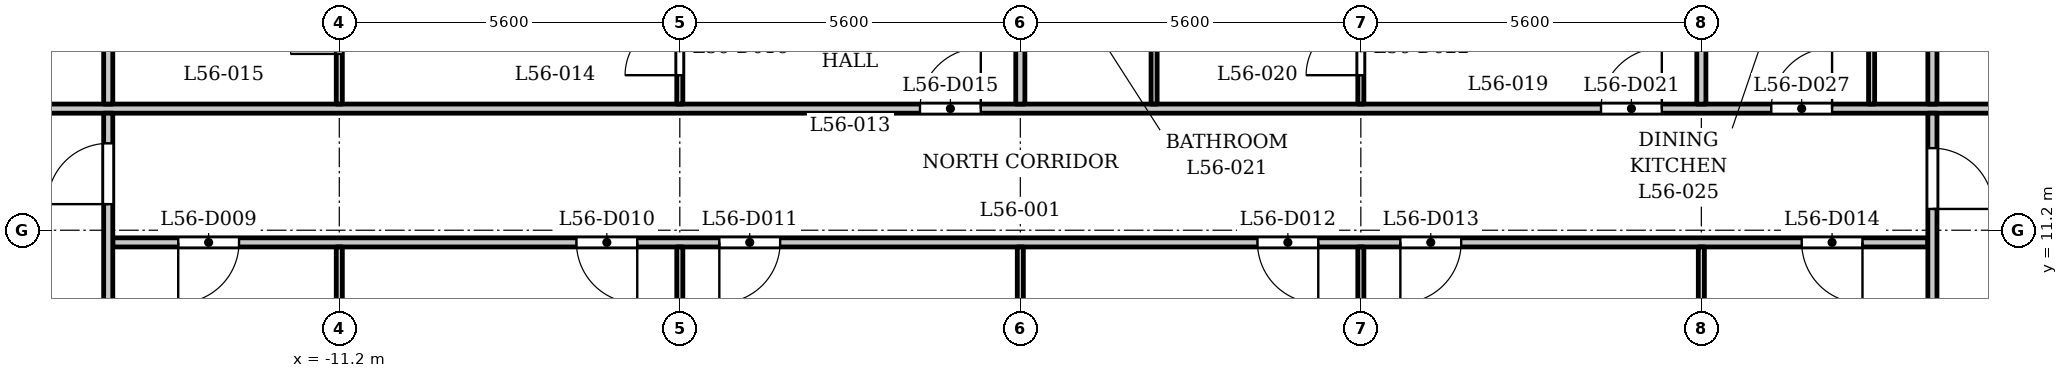
"""IFC4 building model, lengths in metres.
Left out: names, types, materials, properties, quantities, classifications, styles, units other than length and angle.
Written with IfcOpenShell. Run it as: python <this file> out.ifc"""

import sys

from ifc_helpers import new_model, si_unit, direction, frame, frame_2d, origin, place, context, subcontext, project, spatial, rectangle, extrude, element, fill, save


model = new_model("IFC4")
c1 = context("Model", 3, precision=1e-05, world=origin(), true_north=direction((0.0, 1.0)))
c2 = subcontext(c1, "Body", "Model", "MODEL_VIEW")
j1 = project(units=[si_unit("LENGTHUNIT", "METRE"), si_unit("PLANEANGLEUNIT", "RADIAN")], contexts=[c1])
p1 = place(None, origin())
s1 = spatial("IfcSite", under=j1, at=p1, CompositionType="ELEMENT")
p2 = place(p1, origin())
s2 = spatial("IfcBuilding", under=s1, at=p2, CompositionType="ELEMENT")
p3 = place(p2, frame((0.0, 0.0, 216.9)))
s3 = spatial("IfcBuildingStorey", under=s2, at=p3, CompositionType="ELEMENT", Elevation=216.9)
p4 = place(p3, frame((-14.925, 11.0, 0.0), z_axis=(0.0, 0.0, 1.0), x_axis=(1.0, 0.0, 0.0)))
e1 = element("IfcWall", 1, at=p4, inside=s3, PredefinedType="PARTITIONING", context=c2, shape_type="SweptSolid", body=[
    extrude(rectangle(XDim=29.85, YDim=0.15, at=frame_2d((14.925, 0.0))), origin(), (0.0, 0.0, 1.0), 3.2),
])
p5 = place(p4, frame((1.076, 0.0, 0.0)))
e2 = element("IfcOpeningElement", 2, at=p5, cuts=e1, PredefinedType="OPENING", context=c2, shape_type="SweptSolid", body=[
    extrude(rectangle(XDim=1.0, YDim=2.1, at=frame_2d((0.5, 1.05))), frame((0.0, 0.085, 0.0), z_axis=(0.0, -1.0, 0.0), x_axis=(1.0, 0.0, 0.0)), (0.0, 0.0, 1.0), 0.17),
])
p6 = place(p4, frame((7.625, 0.0, 0.0)))
e3 = element("IfcOpeningElement", 3, at=p6, cuts=e1, PredefinedType="OPENING", context=c2, shape_type="SweptSolid", body=[
    extrude(rectangle(XDim=1.0, YDim=2.1, at=frame_2d((0.5, 1.05))), frame((0.0, 0.085, 0.0), z_axis=(0.0, -1.0, 0.0), x_axis=(1.0, 0.0, 0.0)), (0.0, 0.0, 1.0), 0.17),
])
p7 = place(p4, frame((9.975, 0.0, 0.0)))
e4 = element("IfcOpeningElement", 4, at=p7, cuts=e1, PredefinedType="OPENING", context=c2, shape_type="SweptSolid", body=[
    extrude(rectangle(XDim=1.0, YDim=2.1, at=frame_2d((0.5, 1.05))), frame((0.0, 0.085, 0.0), z_axis=(0.0, -1.0, 0.0), x_axis=(1.0, 0.0, 0.0)), (0.0, 0.0, 1.0), 0.17),
])
p8 = place(p4, frame((18.825, 0.0, 0.0)))
e5 = element("IfcOpeningElement", 5, at=p8, cuts=e1, PredefinedType="OPENING", context=c2, shape_type="SweptSolid", body=[
    extrude(rectangle(XDim=1.0, YDim=2.1, at=frame_2d((0.5, 1.05))), frame((0.0, 0.085, 0.0), z_axis=(0.0, -1.0, 0.0), x_axis=(1.0, 0.0, 0.0)), (0.0, 0.0, 1.0), 0.17),
])
p9 = place(p4, frame((21.175, 0.0, 0.0)))
e6 = element("IfcOpeningElement", 6, at=p9, cuts=e1, PredefinedType="OPENING", context=c2, shape_type="SweptSolid", body=[
    extrude(rectangle(XDim=1.0, YDim=2.1, at=frame_2d((0.5, 1.05))), frame((0.0, 0.085, 0.0), z_axis=(0.0, -1.0, 0.0), x_axis=(1.0, 0.0, 0.0)), (0.0, 0.0, 1.0), 0.17),
])
p10 = place(p4, frame((27.775, 0.0, 0.0)))
e7 = element("IfcOpeningElement", 7, at=p10, cuts=e1, PredefinedType="OPENING", context=c2, shape_type="SweptSolid", body=[
    extrude(rectangle(XDim=1.0, YDim=2.1, at=frame_2d((0.5, 1.05))), frame((0.0, 0.085, 0.0), z_axis=(0.0, -1.0, 0.0), x_axis=(1.0, 0.0, 0.0)), (0.0, 0.0, 1.0), 0.17),
])
p11 = place(p3, frame((-17.4, 13.2, 0.0), z_axis=(0.0, 0.0, 1.0), x_axis=(1.0, 0.0, 0.0)))
e8 = element("IfcWall", 8, at=p11, inside=s3, PredefinedType="PARTITIONING", context=c2, shape_type="SweptSolid", body=[
    extrude(rectangle(XDim=34.8, YDim=0.15, at=frame_2d((17.4, 0.0))), origin(), (0.0, 0.0, 1.0), 3.2),
])
p12 = place(p11, frame((0.25, 0.0, 0.0)))
e9 = element("IfcOpeningElement", 9, at=p12, cuts=e8, PredefinedType="OPENING", context=c2, shape_type="SweptSolid", body=[
    extrude(rectangle(XDim=1.0, YDim=2.1, at=frame_2d((0.5, 1.05))), frame((0.0, 0.085, 0.0), z_axis=(0.0, -1.0, 0.0), x_axis=(1.0, 0.0, 0.0)), (0.0, 0.0, 1.0), 0.17),
])
p13 = place(p11, frame((33.65, 0.0, 0.0)))
e10 = element("IfcOpeningElement", 10, at=p13, cuts=e8, PredefinedType="OPENING", context=c2, shape_type="SweptSolid", body=[
    extrude(rectangle(XDim=1.0, YDim=2.1, at=frame_2d((0.5, 1.05))), frame((0.0, 0.085, 0.0), z_axis=(0.0, -1.0, 0.0), x_axis=(1.0, 0.0, 0.0)), (0.0, 0.0, 1.0), 0.17),
])
p14 = place(p11, frame((15.75, 0.0, 0.0)))
e11 = element("IfcOpeningElement", 11, at=p14, cuts=e8, PredefinedType="OPENING", context=c2, shape_type="SweptSolid", body=[
    extrude(rectangle(XDim=1.0, YDim=2.1, at=frame_2d((0.5, 1.05))), frame((0.0, 0.085, 0.0), z_axis=(0.0, -1.0, 0.0), x_axis=(1.0, 0.0, 0.0)), (0.0, 0.0, 1.0), 0.17),
])
p15 = place(p11, frame((26.95, 0.0, 0.0)))
e12 = element("IfcOpeningElement", 12, at=p15, cuts=e8, PredefinedType="OPENING", context=c2, shape_type="SweptSolid", body=[
    extrude(rectangle(XDim=1.0, YDim=2.1, at=frame_2d((0.5, 1.05))), frame((0.0, 0.085, 0.0), z_axis=(0.0, -1.0, 0.0), x_axis=(1.0, 0.0, 0.0)), (0.0, 0.0, 1.0), 0.17),
])
p16 = place(p11, frame((29.75, 0.0, 0.0)))
e13 = element("IfcOpeningElement", 13, at=p16, cuts=e8, PredefinedType="OPENING", context=c2, shape_type="SweptSolid", body=[
    extrude(rectangle(XDim=1.0, YDim=2.1, at=frame_2d((0.5, 1.05))), frame((0.0, 0.085, 0.0), z_axis=(0.0, -1.0, 0.0), x_axis=(1.0, 0.0, 0.0)), (0.0, 0.0, 1.0), 0.17),
])
p17 = place(p3, frame((-15.0, 6.769, 0.0), z_axis=(0.0, 0.0, 1.0), x_axis=(0.0, 1.0, 0.0)))
e14 = element("IfcWall", 14, at=p17, inside=s3, PredefinedType="PARTITIONING", context=c2, shape_type="SweptSolid", body=[
    extrude(rectangle(XDim=6.356, YDim=0.15, at=frame_2d((3.178, 0.0))), origin(), (0.0, 0.0, 1.0), 3.2),
])
p18 = place(p17, frame((4.86, 0.0, 0.0)))
e15 = element("IfcOpeningElement", 15, at=p18, cuts=e14, PredefinedType="OPENING", context=c2, shape_type="SweptSolid", body=[
    extrude(rectangle(XDim=1.0, YDim=2.1, at=frame_2d((0.5, 1.05))), frame((0.0, 0.085, 0.0), z_axis=(0.0, -1.0, 0.0), x_axis=(1.0, 0.0, 0.0)), (0.0, 0.0, 1.0), 0.17),
])
p19 = place(p3, frame((-15.0, 13.275, 0.0), z_axis=(0.0, 0.0, 1.0), x_axis=(0.0, 1.0, 0.0)))
e16 = element("IfcWall", 16, at=p19, inside=s3, PredefinedType="PARTITIONING", context=c2, shape_type="SweptSolid", body=[
    extrude(rectangle(XDim=2.05, YDim=0.15, at=frame_2d((1.025, 0.0))), origin(), (0.0, 0.0, 1.0), 3.2),
])
p20 = place(p3, frame((-11.2, 7.32, 0.0), z_axis=(0.0, 0.0, 1.0), x_axis=(0.0, 1.0, 0.0)))
e17 = element("IfcWall", 17, at=p20, inside=s3, PredefinedType="PARTITIONING", context=c2, shape_type="SweptSolid", body=[
    extrude(rectangle(XDim=3.605, YDim=0.1, at=frame_2d((1.802, 0.0))), origin(), (0.0, 0.0, 1.0), 3.2),
])
p21 = place(p3, frame((-11.2, 13.275, 0.0), z_axis=(0.0, 0.0, 1.0), x_axis=(0.0, 1.0, 0.0)))
e18 = element("IfcWall", 18, at=p21, inside=s3, PredefinedType="PARTITIONING", context=c2, shape_type="SweptSolid", body=[
    extrude(rectangle(XDim=3.475, YDim=0.1, at=frame_2d((1.738, 0.0))), origin(), (0.0, 0.0, 1.0), 3.2),
])
p22 = place(p21, frame((0.825, 0.0, 0.0)))
e19 = element("IfcOpeningElement", 19, at=p22, cuts=e18, PredefinedType="OPENING", context=c2, shape_type="SweptSolid", body=[
    extrude(rectangle(XDim=0.8, YDim=2.1, at=frame_2d((0.4, 1.05))), frame((0.0, 0.06, 0.0), z_axis=(0.0, -1.0, 0.0), x_axis=(1.0, 0.0, 0.0)), (0.0, 0.0, 1.0), 0.12),
])
p23 = place(p3, frame((-5.6, 7.32, 0.0), z_axis=(0.0, 0.0, 1.0), x_axis=(0.0, 1.0, 0.0)))
e20 = element("IfcWall", 20, at=p23, inside=s3, PredefinedType="PARTITIONING", context=c2, shape_type="SweptSolid", body=[
    extrude(rectangle(XDim=3.605, YDim=0.1, at=frame_2d((1.802, 0.0))), origin(), (0.0, 0.0, 1.0), 3.2),
])
p24 = place(p3, frame((-5.6, 13.275, 0.0), z_axis=(0.0, 0.0, 1.0), x_axis=(0.0, 1.0, 0.0)))
e21 = element("IfcWall", 21, at=p24, inside=s3, PredefinedType="PARTITIONING", context=c2, shape_type="SweptSolid", body=[
    extrude(rectangle(XDim=3.475, YDim=0.1, at=frame_2d((1.738, 0.0))), origin(), (0.0, 0.0, 1.0), 3.2),
])
p25 = place(p24, frame((0.475, 0.0, 0.0)))
e22 = element("IfcOpeningElement", 22, at=p25, cuts=e21, PredefinedType="OPENING", context=c2, shape_type="SweptSolid", body=[
    extrude(rectangle(XDim=0.9, YDim=2.1, at=frame_2d((0.45, 1.05))), frame((0.0, 0.06, 0.0), z_axis=(0.0, -1.0, 0.0), x_axis=(1.0, 0.0, 0.0)), (0.0, 0.0, 1.0), 0.12),
])
p26 = place(p3, frame((0.0, 7.32, 0.0), z_axis=(0.0, 0.0, 1.0), x_axis=(0.0, 1.0, 0.0)))
e23 = element("IfcWall", 23, at=p26, inside=s3, PredefinedType="PARTITIONING", context=c2, shape_type="SweptSolid", body=[
    extrude(rectangle(XDim=3.605, YDim=0.1, at=frame_2d((1.802, 0.0))), origin(), (0.0, 0.0, 1.0), 3.2),
])
p27 = place(p3, frame((0.0, 13.275, 0.0), z_axis=(0.0, 0.0, 1.0), x_axis=(0.0, 1.0, 0.0)))
e24 = element("IfcWall", 24, at=p27, inside=s3, PredefinedType="PARTITIONING", context=c2, shape_type="SweptSolid", body=[
    extrude(rectangle(XDim=3.475, YDim=0.15, at=frame_2d((1.738, 0.0))), origin(), (0.0, 0.0, 1.0), 3.2),
])
p28 = place(p3, frame((2.2, 13.275, 0.0), z_axis=(0.0, 0.0, 1.0), x_axis=(0.0, 1.0, 0.0)))
e25 = element("IfcWall", 25, at=p28, inside=s3, PredefinedType="PARTITIONING", context=c2, shape_type="SweptSolid", body=[
    extrude(rectangle(XDim=3.475, YDim=0.1, at=frame_2d((1.738, 0.0))), origin(), (0.0, 0.0, 1.0), 3.2),
])
p29 = place(p3, frame((5.6, 7.32, 0.0), z_axis=(0.0, 0.0, 1.0), x_axis=(0.0, 1.0, 0.0)))
e26 = element("IfcWall", 26, at=p29, inside=s3, PredefinedType="PARTITIONING", context=c2, shape_type="SweptSolid", body=[
    extrude(rectangle(XDim=3.605, YDim=0.1, at=frame_2d((1.802, 0.0))), origin(), (0.0, 0.0, 1.0), 3.2),
])
p30 = place(p3, frame((5.6, 13.275, 0.0), z_axis=(0.0, 0.0, 1.0), x_axis=(0.0, 1.0, 0.0)))
e27 = element("IfcWall", 27, at=p30, inside=s3, PredefinedType="PARTITIONING", context=c2, shape_type="SweptSolid", body=[
    extrude(rectangle(XDim=3.475, YDim=0.1, at=frame_2d((1.738, 0.0))), origin(), (0.0, 0.0, 1.0), 3.2),
])
p31 = place(p30, frame((0.475, 0.0, 0.0)))
e28 = element("IfcOpeningElement", 28, at=p31, cuts=e27, PredefinedType="OPENING", context=c2, shape_type="SweptSolid", body=[
    extrude(rectangle(XDim=0.9, YDim=2.1, at=frame_2d((0.45, 1.05))), frame((0.0, 0.06, 0.0), z_axis=(0.0, -1.0, 0.0), x_axis=(1.0, 0.0, 0.0)), (0.0, 0.0, 1.0), 0.12),
])
p32 = place(p3, frame((11.2, 7.32, 0.0), z_axis=(0.0, 0.0, 1.0), x_axis=(0.0, 1.0, 0.0)))
e29 = element("IfcWall", 29, at=p32, inside=s3, PredefinedType="PARTITIONING", context=c2, shape_type="SweptSolid", body=[
    extrude(rectangle(XDim=3.605, YDim=0.1, at=frame_2d((1.802, 0.0))), origin(), (0.0, 0.0, 1.0), 3.2),
])
p33 = place(p3, frame((11.2, 13.275, 0.0), z_axis=(0.0, 0.0, 1.0), x_axis=(0.0, 1.0, 0.0)))
e30 = element("IfcWall", 30, at=p33, inside=s3, PredefinedType="PARTITIONING", context=c2, shape_type="SweptSolid", body=[
    extrude(rectangle(XDim=3.475, YDim=0.15, at=frame_2d((1.738, 0.0))), origin(), (0.0, 0.0, 1.0), 3.2),
])
p34 = place(p3, frame((14.0, 13.275, 0.0), z_axis=(0.0, 0.0, 1.0), x_axis=(0.0, 1.0, 0.0)))
e31 = element("IfcWall", 31, at=p34, inside=s3, PredefinedType="PARTITIONING", context=c2, shape_type="SweptSolid", body=[
    extrude(rectangle(XDim=3.475, YDim=0.1, at=frame_2d((1.738, 0.0))), origin(), (0.0, 0.0, 1.0), 3.2),
])
p35 = place(p3, frame((15.0, 6.769, 0.0), z_axis=(0.0, 0.0, 1.0), x_axis=(0.0, 1.0, 0.0)))
e32 = element("IfcWall", 32, at=p35, inside=s3, PredefinedType="PARTITIONING", context=c2, shape_type="SweptSolid", body=[
    extrude(rectangle(XDim=6.356, YDim=0.15, at=frame_2d((3.178, 0.0))), origin(), (0.0, 0.0, 1.0), 3.2),
])
p36 = place(p35, frame((4.781, 0.0, 0.0)))
e33 = element("IfcOpeningElement", 33, at=p36, cuts=e32, PredefinedType="OPENING", context=c2, shape_type="SweptSolid", body=[
    extrude(rectangle(XDim=1.0, YDim=2.1, at=frame_2d((0.5, 1.05))), frame((0.0, 0.085, 0.0), z_axis=(0.0, -1.0, 0.0), x_axis=(1.0, 0.0, 0.0)), (0.0, 0.0, 1.0), 0.17),
])
p37 = place(p3, frame((15.0, 13.275, 0.0), z_axis=(0.0, 0.0, 1.0), x_axis=(0.0, 1.0, 0.0)))
e34 = element("IfcWall", 34, at=p37, inside=s3, PredefinedType="PARTITIONING", context=c2, shape_type="SweptSolid", body=[
    extrude(rectangle(XDim=2.05, YDim=0.15, at=frame_2d((1.025, 0.0))), origin(), (0.0, 0.0, 1.0), 3.2),
])
p38 = place(p18, origin())
e35 = element("IfcDoor", 35, at=p38, inside=s3, OperationType="SINGLE_SWING_RIGHT", PredefinedType="DOOR", context=c2, shape_type="SweptSolid", body=[
    extrude(rectangle(XDim=1.0, YDim=2.1, at=frame_2d((0.5, 1.05))), frame((0.0, 0.025, 0.0), z_axis=(0.0, -1.0, 0.0), x_axis=(1.0, 0.0, 0.0)), (0.0, 0.0, 1.0), 0.05),
])
fill(e15, e35)
p39 = place(p36, origin())
e36 = element("IfcDoor", 36, at=p39, inside=s3, OperationType="SINGLE_SWING_LEFT", PredefinedType="DOOR", context=c2, shape_type="SweptSolid", body=[
    extrude(rectangle(XDim=1.0, YDim=2.1, at=frame_2d((0.5, 1.05))), frame((0.0, 0.025, 0.0), z_axis=(0.0, -1.0, 0.0), x_axis=(1.0, 0.0, 0.0)), (0.0, 0.0, 1.0), 0.05),
])
fill(e33, e36)
p40 = place(p5, origin())
e37 = element("IfcDoor", 37, at=p40, inside=s3, OperationType="SINGLE_SWING_LEFT", PredefinedType="DOOR", context=c2, shape_type="SweptSolid", body=[
    extrude(rectangle(XDim=1.0, YDim=2.1, at=frame_2d((0.5, 1.05))), frame((0.0, 0.025, 0.0), z_axis=(0.0, -1.0, 0.0), x_axis=(1.0, 0.0, 0.0)), (0.0, 0.0, 1.0), 0.05),
])
fill(e2, e37)
p41 = place(p6, origin())
e38 = element("IfcDoor", 38, at=p41, inside=s3, OperationType="SINGLE_SWING_RIGHT", PredefinedType="DOOR", context=c2, shape_type="SweptSolid", body=[
    extrude(rectangle(XDim=1.0, YDim=2.1, at=frame_2d((0.5, 1.05))), frame((0.0, 0.025, 0.0), z_axis=(0.0, -1.0, 0.0), x_axis=(1.0, 0.0, 0.0)), (0.0, 0.0, 1.0), 0.05),
])
fill(e3, e38)
p42 = place(p7, origin())
e39 = element("IfcDoor", 39, at=p42, inside=s3, OperationType="SINGLE_SWING_LEFT", PredefinedType="DOOR", context=c2, shape_type="SweptSolid", body=[
    extrude(rectangle(XDim=1.0, YDim=2.1, at=frame_2d((0.5, 1.05))), frame((0.0, 0.025, 0.0), z_axis=(0.0, -1.0, 0.0), x_axis=(1.0, 0.0, 0.0)), (0.0, 0.0, 1.0), 0.05),
])
fill(e4, e39)
p43 = place(p8, origin())
e40 = element("IfcDoor", 40, at=p43, inside=s3, OperationType="SINGLE_SWING_RIGHT", PredefinedType="DOOR", context=c2, shape_type="SweptSolid", body=[
    extrude(rectangle(XDim=1.0, YDim=2.1, at=frame_2d((0.5, 1.05))), frame((0.0, 0.025, 0.0), z_axis=(0.0, -1.0, 0.0), x_axis=(1.0, 0.0, 0.0)), (0.0, 0.0, 1.0), 0.05),
])
fill(e5, e40)
p44 = place(p9, origin())
e41 = element("IfcDoor", 41, at=p44, inside=s3, OperationType="SINGLE_SWING_LEFT", PredefinedType="DOOR", context=c2, shape_type="SweptSolid", body=[
    extrude(rectangle(XDim=1.0, YDim=2.1, at=frame_2d((0.5, 1.05))), frame((0.0, 0.025, 0.0), z_axis=(0.0, -1.0, 0.0), x_axis=(1.0, 0.0, 0.0)), (0.0, 0.0, 1.0), 0.05),
])
fill(e6, e41)
p45 = place(p10, origin())
e42 = element("IfcDoor", 42, at=p45, inside=s3, OperationType="SINGLE_SWING_RIGHT", PredefinedType="DOOR", context=c2, shape_type="SweptSolid", body=[
    extrude(rectangle(XDim=1.0, YDim=2.1, at=frame_2d((0.5, 1.05))), frame((0.0, 0.025, 0.0), z_axis=(0.0, -1.0, 0.0), x_axis=(1.0, 0.0, 0.0)), (0.0, 0.0, 1.0), 0.05),
])
fill(e7, e42)
p46 = place(p14, origin())
e43 = element("IfcDoor", 43, at=p46, inside=s3, OperationType="SINGLE_SWING_LEFT", PredefinedType="DOOR", context=c2, shape_type="SweptSolid", body=[
    extrude(rectangle(XDim=1.0, YDim=2.1, at=frame_2d((0.5, 1.05))), frame((0.0, 0.025, 0.0), z_axis=(0.0, -1.0, 0.0), x_axis=(1.0, 0.0, 0.0)), (0.0, 0.0, 1.0), 0.05),
])
fill(e11, e43)
p47 = place(p25, origin())
e44 = element("IfcDoor", 44, at=p47, inside=s3, OperationType="SINGLE_SWING_RIGHT", PredefinedType="DOOR", context=c2, shape_type="SweptSolid", body=[
    extrude(rectangle(XDim=0.9, YDim=2.1, at=frame_2d((0.45, 1.05))), frame((0.0, 0.025, 0.0), z_axis=(0.0, -1.0, 0.0), x_axis=(1.0, 0.0, 0.0)), (0.0, 0.0, 1.0), 0.05),
])
fill(e22, e44)
p48 = place(p22, origin())
e45 = element("IfcDoor", 45, at=p48, inside=s3, OperationType="SINGLE_SWING_RIGHT", PredefinedType="DOOR", context=c2, shape_type="SweptSolid", body=[
    extrude(rectangle(XDim=0.8, YDim=2.1, at=frame_2d((0.4, 1.05))), frame((0.0, 0.025, 0.0), z_axis=(0.0, -1.0, 0.0), x_axis=(1.0, 0.0, 0.0)), (0.0, 0.0, 1.0), 0.05),
])
fill(e19, e45)
p49 = place(p15, origin())
e46 = element("IfcDoor", 46, at=p49, inside=s3, OperationType="SINGLE_SWING_LEFT", PredefinedType="DOOR", context=c2, shape_type="SweptSolid", body=[
    extrude(rectangle(XDim=1.0, YDim=2.1, at=frame_2d((0.5, 1.05))), frame((0.0, 0.025, 0.0), z_axis=(0.0, -1.0, 0.0), x_axis=(1.0, 0.0, 0.0)), (0.0, 0.0, 1.0), 0.05),
])
fill(e12, e46)
p50 = place(p31, origin())
e47 = element("IfcDoor", 47, at=p50, inside=s3, OperationType="SINGLE_SWING_RIGHT", PredefinedType="DOOR", context=c2, shape_type="SweptSolid", body=[
    extrude(rectangle(XDim=0.9, YDim=2.1, at=frame_2d((0.45, 1.05))), frame((0.0, 0.025, 0.0), z_axis=(0.0, -1.0, 0.0), x_axis=(1.0, 0.0, 0.0)), (0.0, 0.0, 1.0), 0.05),
])
fill(e28, e47)
p51 = place(p16, origin())
e48 = element("IfcDoor", 48, at=p51, inside=s3, OperationType="SINGLE_SWING_LEFT", PredefinedType="DOOR", context=c2, shape_type="SweptSolid", body=[
    extrude(rectangle(XDim=1.0, YDim=2.1, at=frame_2d((0.5, 1.05))), frame((0.0, 0.025, 0.0), z_axis=(0.0, -1.0, 0.0), x_axis=(1.0, 0.0, 0.0)), (0.0, 0.0, 1.0), 0.05),
])
fill(e13, e48)
save(model, sys.argv[1])
